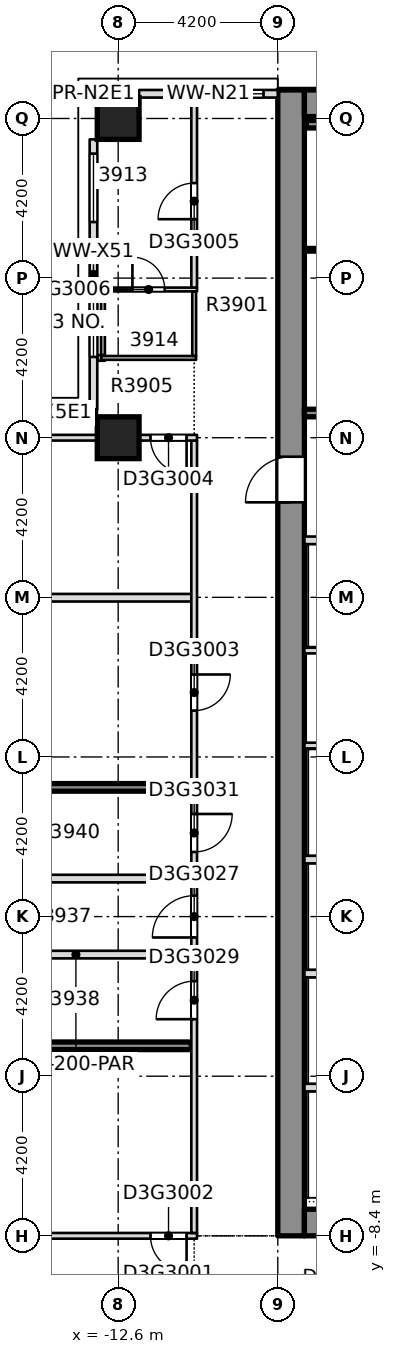
"""IFC4 building model, lengths in metres.
Left out: names, types, materials, properties, quantities, classifications, styles, units other than length and angle.
Written with IfcOpenShell. Run it as: python <this file> out.ifc"""

import sys

from ifc_helpers import new_model, si_unit, direction, frame, frame_2d, origin, origin_2d, place, context, subcontext, project, spatial, rectangle, extrude, element, fill, save


model = new_model("IFC4")
c1 = context("Model", 3, precision=1e-05, world=origin(), true_north=direction((0.0, 1.0)))
c2 = subcontext(c1, "Body", "Model", "MODEL_VIEW")
j1 = project(units=[si_unit("LENGTHUNIT", "METRE"), si_unit("PLANEANGLEUNIT", "RADIAN")], contexts=[c1])
p1 = place(None, origin())
s1 = spatial("IfcSite", under=j1, at=p1, CompositionType="ELEMENT")
p2 = place(p1, origin())
s2 = spatial("IfcBuilding", under=s1, at=p2, CompositionType="ELEMENT")
p3 = place(p2, frame((0.0, 0.0, 153.8)))
s3 = spatial("IfcBuildingStorey", under=s2, at=p3, CompositionType="ELEMENT", Elevation=153.8)
p4 = place(p3, frame((-8.05, -8.4, -0.4), z_axis=(0.0, 0.0, 1.0), x_axis=(0.0, 1.0, 0.0)))
e1 = element("IfcWall", 1, at=p4, inside=s3, PredefinedType="SOLIDWALL", context=c2, shape_type="SweptSolid", body=[
    extrude(rectangle(XDim=30.15, YDim=0.7, at=frame_2d((15.075, 0.0))), origin(), (0.0, 0.0, 1.0), 3.45),
])
p5 = place(p4, frame((19.3, 0.0, 0.4)))
e2 = element("IfcOpeningElement", 2, at=p5, cuts=e1, PredefinedType="OPENING", context=c2, shape_type="SweptSolid", body=[
    extrude(rectangle(XDim=1.2, YDim=2.1, at=frame_2d((0.6, 1.05))), frame((0.0, 0.36, 0.0), z_axis=(0.0, -1.0, 0.0), x_axis=(1.0, 0.0, 0.0)), (0.0, 0.0, 1.0), 0.72),
])
p6 = place(p3, frame((-7.7, -8.05, -0.4), z_axis=(0.0, 0.0, 1.0), x_axis=(1.0, 0.0, 0.0)))
e3 = element("IfcWall", 3, at=p6, inside=s3, PredefinedType="SHEAR", context=c2, shape_type="SweptSolid", body=[
    extrude(rectangle(XDim=15.4, YDim=0.7, at=frame_2d((7.7, 0.0))), origin(), (0.0, 0.0, 1.0), 3.45),
])
p7 = place(p6, frame((2.95, 0.0, 0.4)))
e4 = element("IfcOpeningElement", 4, at=p7, cuts=e3, PredefinedType="OPENING", context=c2, shape_type="SweptSolid", body=[
    extrude(rectangle(XDim=1.8, YDim=2.1, at=frame_2d((0.9, 1.05))), frame((0.0, 0.36, 0.0), z_axis=(0.0, -1.0, 0.0), x_axis=(1.0, 0.0, 0.0)), (0.0, 0.0, 1.0), 0.72),
])
p8 = place(p6, frame((10.65, 0.0, 0.4)))
e5 = element("IfcOpeningElement", 5, at=p8, cuts=e3, PredefinedType="OPENING", context=c2, shape_type="SweptSolid", body=[
    extrude(rectangle(XDim=1.8, YDim=2.1, at=frame_2d((0.9, 1.05))), frame((0.0, 0.36, 0.0), z_axis=(0.0, -1.0, 0.0), x_axis=(1.0, 0.0, 0.0)), (0.0, 0.0, 1.0), 0.72),
])
p9 = place(p3, frame((-7.7, 21.4, -0.4), z_axis=(0.0, 0.0, 1.0), x_axis=(1.0, 0.0, 0.0)))
e6 = element("IfcWall", 6, at=p9, inside=s3, PredefinedType="SHEAR", context=c2, shape_type="SweptSolid", body=[
    extrude(rectangle(XDim=15.4, YDim=0.7, at=frame_2d((7.7, 0.0))), origin(), (0.0, 0.0, 1.0), 3.45),
])
for number, where, z_axis, x_axis in (
    (7, (-12.6, 12.6, -0.4), (0.0, 0.0, 1.0), (1.0, 0.0, 0.0)),
    (8, (-12.6, 21.0, -0.4), (0.0, 0.0, 1.0), (1.0, 0.0, 0.0)),
):
    element("IfcColumn", number, at=place(p3, frame(where, z_axis=z_axis, x_axis=x_axis)), inside=s3, PredefinedType="COLUMN", context=c2, shape_type="SweptSolid", body=[
        extrude(rectangle(XDim=1.1, YDim=1.1, at=origin_2d()), origin(), (0.0, 0.0, 1.0), 3.45),
    ])
p10 = place(p3, frame((-21.55, -8.4, 0.0), z_axis=(0.0, 0.0, 1.0), x_axis=(1.0, 0.0, 0.0)))
e9 = element("IfcWall", 9, at=p10, inside=s3, PredefinedType="PARTITIONING", context=c2, shape_type="SweptSolid", body=[
    extrude(rectangle(XDim=11.025, YDim=0.15, at=frame_2d((5.513, 0.0))), origin(), (0.0, 0.0, 1.0), 3.05),
])
p11 = place(p10, frame((9.8, 0.0, 0.0)))
e10 = element("IfcOpeningElement", 10, at=p11, cuts=e9, PredefinedType="OPENING", context=c2, shape_type="SweptSolid", body=[
    extrude(rectangle(XDim=0.95, YDim=2.1, at=frame_2d((0.475, 1.05))), frame((0.0, 0.085, 0.0), z_axis=(0.0, -1.0, 0.0), x_axis=(1.0, 0.0, 0.0)), (0.0, 0.0, 1.0), 0.17),
])
p12 = place(p3, frame((-20.448, -3.4, 0.0), z_axis=(0.0, 0.0, 1.0), x_axis=(1.0, 0.0, 0.0)))
e11 = element("IfcWall", 11, at=p12, inside=s3, PredefinedType="SOLIDWALL", context=c2, shape_type="SweptSolid", body=[
    extrude(rectangle(XDim=9.773, YDim=0.2, at=frame_2d((4.886, 0.0))), origin(), (0.0, 0.0, 1.0), 3.05),
])
for number, where, z_axis, x_axis in (
    (12, (-16.75, -1.0, 0.0), (0.0, 0.0, 1.0), (1.0, 0.0, 0.0)),
    (13, (-16.75, 1.0, 0.0), (0.0, 0.0, 1.0), (1.0, 0.0, 0.0)),
):
    element("IfcWall", number, at=place(p3, frame(where, z_axis=z_axis, x_axis=x_axis)), inside=s3, PredefinedType="PARTITIONING", context=c2, shape_type="SweptSolid", body=[
        extrude(rectangle(XDim=6.075, YDim=0.2, at=frame_2d((3.038, 0.0))), origin(), (0.0, 0.0, 1.0), 3.05),
    ])
p13 = place(p3, frame((-21.55, 8.39, 0.0), z_axis=(0.0, 0.0, 1.0), x_axis=(1.0, 0.0, 0.0)))
e14 = element("IfcWall", 14, at=p13, inside=s3, PredefinedType="PARTITIONING", context=c2, shape_type="SweptSolid", body=[
    extrude(rectangle(XDim=10.875, YDim=0.2, at=frame_2d((5.438, 0.0))), origin(), (0.0, 0.0, 1.0), 3.05),
])
p14 = place(p3, frame((-13.15, 14.7, 0.0), z_axis=(0.0, 0.0, 1.0), x_axis=(1.0, 0.0, 0.0)))
e15 = element("IfcWall", 15, at=p14, inside=s3, PredefinedType="PARTITIONING", context=c2, shape_type="SweptSolid", body=[
    extrude(rectangle(XDim=0.2, YDim=0.15, at=frame_2d((0.1, 0.0))), origin(), (0.0, 0.0, 1.0), 3.05),
])
p15 = place(p3, frame((-13.05, 14.7, 0.0), z_axis=(0.0, 0.0, 1.0), x_axis=(1.0, 0.0, 0.0)))
e16 = element("IfcWall", 16, at=p15, inside=s3, PredefinedType="PARTITIONING", context=c2, shape_type="SweptSolid", body=[
    extrude(rectangle(XDim=2.5, YDim=0.1, at=frame_2d((1.25, 0.0))), origin(), (0.0, 0.0, 1.0), 3.05),
])
p16 = place(p3, frame((-13.05, 16.5, 0.0), z_axis=(0.0, 0.0, 1.0), x_axis=(1.0, 0.0, 0.0)))
e17 = element("IfcWall", 17, at=p16, inside=s3, PredefinedType="PARTITIONING", context=c2, shape_type="SweptSolid", body=[
    extrude(rectangle(XDim=2.525, YDim=0.1, at=frame_2d((1.263, 0.0))), origin(), (0.0, 0.0, 1.0), 3.05),
])
p17 = place(p16, frame((0.825, 0.0, 0.0)))
e18 = element("IfcOpeningElement", 18, at=p17, cuts=e17, PredefinedType="OPENING", context=c2, shape_type="SweptSolid", body=[
    extrude(rectangle(XDim=0.85, YDim=2.1, at=frame_2d((0.425, 1.05))), frame((0.0, 0.06, 0.0), z_axis=(0.0, -1.0, 0.0), x_axis=(1.0, 0.0, 0.0)), (0.0, 0.0, 1.0), 0.12),
])
p18 = place(p3, frame((-13.0, 14.775, 0.0), z_axis=(0.0, 0.0, 1.0), x_axis=(0.0, 1.0, 0.0)))
e19 = element("IfcWall", 19, at=p18, inside=s3, PredefinedType="PARTITIONING", context=c2, shape_type="SweptSolid", body=[
    extrude(rectangle(XDim=1.675, YDim=0.1, at=frame_2d((0.837, 0.0))), origin(), (0.0, 0.0, 1.0), 3.05),
])
p19 = place(p3, frame((-10.6, -8.325, 0.0), z_axis=(0.0, 0.0, 1.0), x_axis=(0.0, 1.0, 0.0)))
e20 = element("IfcWall", 20, at=p19, inside=s3, PredefinedType="PARTITIONING", context=c2, shape_type="SweptSolid", body=[
    extrude(rectangle(XDim=20.85, YDim=0.15, at=frame_2d((10.425, 0.0))), origin(), (0.0, 0.0, 1.0), 3.05),
])
p20 = place(p19, frame((13.745, 0.0, 0.0)))
e21 = element("IfcOpeningElement", 21, at=p20, cuts=e20, PredefinedType="OPENING", context=c2, shape_type="SweptSolid", body=[
    extrude(rectangle(XDim=0.95, YDim=2.1, at=frame_2d((0.475, 1.05))), frame((0.0, 0.085, 0.0), z_axis=(0.0, -1.0, 0.0), x_axis=(1.0, 0.0, 0.0)), (0.0, 0.0, 1.0), 0.17),
])
p21 = place(p19, frame((7.775, 0.0, 0.0)))
e22 = element("IfcOpeningElement", 22, at=p21, cuts=e20, PredefinedType="OPENING", context=c2, shape_type="SweptSolid", body=[
    extrude(rectangle(XDim=1.1, YDim=2.1, at=frame_2d((0.55, 1.05))), frame((0.0, 0.085, 0.0), z_axis=(0.0, -1.0, 0.0), x_axis=(1.0, 0.0, 0.0)), (0.0, 0.0, 1.0), 0.17),
])
p22 = place(p19, frame((5.625, 0.0, 0.0)))
e23 = element("IfcOpeningElement", 23, at=p22, cuts=e20, PredefinedType="OPENING", context=c2, shape_type="SweptSolid", body=[
    extrude(rectangle(XDim=1.0, YDim=2.1, at=frame_2d((0.5, 1.05))), frame((0.0, 0.085, 0.0), z_axis=(0.0, -1.0, 0.0), x_axis=(1.0, 0.0, 0.0)), (0.0, 0.0, 1.0), 0.17),
])
p23 = place(p19, frame((10.025, 0.0, 0.0)))
e24 = element("IfcOpeningElement", 24, at=p23, cuts=e20, PredefinedType="OPENING", context=c2, shape_type="SweptSolid", body=[
    extrude(rectangle(XDim=1.0, YDim=2.1, at=frame_2d((0.5, 1.05))), frame((0.0, 0.085, 0.0), z_axis=(0.0, -1.0, 0.0), x_axis=(1.0, 0.0, 0.0)), (0.0, 0.0, 1.0), 0.17),
])
p24 = place(p3, frame((-10.6, 14.75, 0.0), z_axis=(0.0, 0.0, 1.0), x_axis=(0.0, 1.0, 0.0)))
e25 = element("IfcWall", 25, at=p24, inside=s3, PredefinedType="PARTITIONING", context=c2, shape_type="SweptSolid", body=[
    extrude(rectangle(XDim=1.7, YDim=0.1, at=frame_2d((0.85, 0.0))), origin(), (0.0, 0.0, 1.0), 3.05),
])
p25 = place(p3, frame((-10.6, 16.55, 0.0), z_axis=(0.0, 0.0, 1.0), x_axis=(0.0, 1.0, 0.0)))
e26 = element("IfcWall", 26, at=p25, inside=s3, PredefinedType="PARTITIONING", context=c2, shape_type="SweptSolid", body=[
    extrude(rectangle(XDim=5.0, YDim=0.15, at=frame_2d((2.5, 0.0))), origin(), (0.0, 0.0, 1.0), 3.05),
])
p26 = place(p25, frame((1.8, 0.0, 0.0)))
e27 = element("IfcOpeningElement", 27, at=p26, cuts=e26, PredefinedType="OPENING", context=c2, shape_type="SweptSolid", body=[
    extrude(rectangle(XDim=0.95, YDim=2.1, at=frame_2d((0.475, 1.05))), frame((0.0, 0.085, 0.0), z_axis=(0.0, -1.0, 0.0), x_axis=(1.0, 0.0, 0.0)), (0.0, 0.0, 1.0), 0.17),
])
p27 = place(p3, frame((-8.4, 21.65, 0.0), z_axis=(0.0, 0.0, 1.0), x_axis=(-1.0, 0.0, 0.0)))
e28 = element("IfcWall", 28, at=p27, inside=s3, PredefinedType="STANDARD", context=c2, shape_type="SweptSolid", body=[
    extrude(rectangle(XDim=3.65, YDim=0.2, at=frame_2d((1.825, 0.0))), origin(), (0.0, 0.0, 1.0), 3.05),
])
p28 = place(p27, frame((0.375, 0.0, 0.2)))
e29 = element("IfcOpeningElement", 29, at=p28, cuts=e28, PredefinedType="OPENING", context=c2, shape_type="SweptSolid", body=[
    extrude(rectangle(XDim=1.8, YDim=2.65, at=frame_2d((0.9, 1.325))), frame((0.0, 0.11, 0.0), z_axis=(0.0, -1.0, 0.0), x_axis=(1.0, 0.0, 0.0)), (0.0, 0.0, 1.0), 0.22),
])
p29 = place(p3, frame((-13.25, 20.45, 0.0), z_axis=(0.0, 0.0, 1.0), x_axis=(0.0, -1.0, 0.0)))
e30 = element("IfcWall", 30, at=p29, inside=s3, PredefinedType="STANDARD", context=c2, shape_type="SweptSolid", body=[
    extrude(rectangle(XDim=7.1, YDim=0.2, at=frame_2d((3.55, 0.0))), origin(), (0.0, 0.0, 1.0), 3.05),
])
p30 = place(p29, frame((3.925, 0.0, 0.2)))
e31 = element("IfcOpeningElement", 31, at=p30, cuts=e30, PredefinedType="OPENING", context=c2, shape_type="SweptSolid", body=[
    extrude(rectangle(XDim=1.8, YDim=2.65, at=frame_2d((0.9, 1.325))), frame((0.0, 0.11, 0.0), z_axis=(0.0, -1.0, 0.0), x_axis=(1.0, 0.0, 0.0)), (0.0, 0.0, 1.0), 0.22),
])
p31 = place(p29, frame((0.375, 0.0, 0.2)))
e32 = element("IfcOpeningElement", 32, at=p31, cuts=e30, PredefinedType="OPENING", context=c2, shape_type="SweptSolid", body=[
    extrude(rectangle(XDim=1.8, YDim=2.65, at=frame_2d((0.9, 1.325))), frame((0.0, 0.11, 0.0), z_axis=(0.0, -1.0, 0.0), x_axis=(1.0, 0.0, 0.0)), (0.0, 0.0, 1.0), 0.22),
])
p32 = place(p3, frame((-13.35, 13.25, 0.0), z_axis=(0.0, 0.0, 1.0), x_axis=(-1.0, 0.0, 0.0)))
e33 = element("IfcWall", 33, at=p32, inside=s3, PredefinedType="STANDARD", context=c2, shape_type="SweptSolid", body=[
    extrude(rectangle(XDim=7.1, YDim=0.2, at=frame_2d((3.55, 0.0))), origin(), (0.0, 0.0, 1.0), 3.05),
])
for number, where, z_axis, x_axis in (
    (34, (-7.699, -4.5, 0.0), (0.0, 0.0, 1.0), (1.0, 0.0, 0.0)),
    (35, (-7.699, -1.5, 0.0), (0.0, 0.0, 1.0), (1.0, 0.0, 0.0)),
    (36, (-7.699, 1.5, 0.0), (0.0, 0.0, 1.0), (1.0, 0.0, 0.0)),
):
    element("IfcWall", number, at=place(p3, frame(where, z_axis=z_axis, x_axis=x_axis)), inside=s3, PredefinedType="PARTITIONING", context=c2, shape_type="SweptSolid", body=[
        extrude(rectangle(XDim=2.124, YDim=0.2, at=frame_2d((1.062, 0.0))), origin(), (0.0, 0.0, 1.0), 3.05),
    ])
p33 = place(p3, frame((-7.699, 4.5, 0.0), z_axis=(0.0, 0.0, 1.0), x_axis=(1.0, 0.0, 0.0)))
e37 = element("IfcWall", 37, at=p33, inside=s3, PredefinedType="PARTITIONING", context=c2, shape_type="SweptSolid", body=[
    extrude(rectangle(XDim=2.274, YDim=0.15, at=frame_2d((1.137, 0.0))), origin(), (0.0, 0.0, 1.0), 3.05),
])
p34 = place(p3, frame((-7.699, 7.0, 0.0), z_axis=(0.0, 0.0, 1.0), x_axis=(1.0, 0.0, 0.0)))
e38 = element("IfcWall", 38, at=p34, inside=s3, PredefinedType="PARTITIONING", context=c2, shape_type="SweptSolid", body=[
    extrude(rectangle(XDim=15.398, YDim=0.15, at=frame_2d((7.699, 0.0))), origin(), (0.0, 0.0, 1.0), 3.05),
])
p35 = place(p34, frame((6.999, 0.0, 0.0)))
e39 = element("IfcOpeningElement", 39, at=p35, cuts=e38, PredefinedType="OPENING", context=c2, shape_type="SweptSolid", body=[
    extrude(rectangle(XDim=1.4, YDim=2.1, at=frame_2d((0.7, 1.05))), frame((0.0, 0.085, 0.0), z_axis=(0.0, -1.0, 0.0), x_axis=(1.0, 0.0, 0.0)), (0.0, 0.0, 1.0), 0.17),
])
p36 = place(p3, frame((-7.699, 9.9, 0.0), z_axis=(0.0, 0.0, 1.0), x_axis=(1.0, 0.0, 0.0)))
e40 = element("IfcWall", 40, at=p36, inside=s3, PredefinedType="PARTITIONING", context=c2, shape_type="SweptSolid", body=[
    extrude(rectangle(XDim=4.099, YDim=0.2, at=frame_2d((2.049, 0.0))), origin(), (0.0, 0.0, 1.0), 3.05),
])
p37 = place(p36, frame((0.749, 0.0, 0.0)))
e41 = element("IfcOpeningElement", 41, at=p37, cuts=e40, PredefinedType="OPENING", context=c2, shape_type="SweptSolid", body=[
    extrude(rectangle(XDim=1.1, YDim=2.1, at=frame_2d((0.55, 1.05))), frame((0.0, 0.11, 0.0), z_axis=(0.0, -1.0, 0.0), x_axis=(1.0, 0.0, 0.0)), (0.0, 0.0, 1.0), 0.22),
])
p38 = place(p3, frame((-7.699, 13.25, 0.0), z_axis=(0.0, 0.0, 1.0), x_axis=(1.0, 0.0, 0.0)))
e42 = element("IfcWall", 42, at=p38, inside=s3, PredefinedType="SOLIDWALL", context=c2, shape_type="SweptSolid", body=[
    extrude(rectangle(XDim=4.274, YDim=0.2, at=frame_2d((2.137, 0.0))), origin(), (0.0, 0.0, 1.0), 3.05),
])
p39 = place(p38, frame((1.249, 0.0, 0.0)))
e43 = element("IfcOpeningElement", 43, at=p39, cuts=e42, PredefinedType="OPENING", context=c2, shape_type="SweptSolid", body=[
    extrude(rectangle(XDim=1.2, YDim=2.1, at=frame_2d((0.6, 1.05))), frame((0.0, 0.11, 0.0), z_axis=(0.0, -1.0, 0.0), x_axis=(1.0, 0.0, 0.0)), (0.0, 0.0, 1.0), 0.22),
])
p40 = place(p3, frame((-7.65, 20.85, 0.0), z_axis=(0.0, 0.0, 1.0), x_axis=(1.0, 0.0, 0.0)))
e44 = element("IfcWall", 44, at=p40, inside=s3, PredefinedType="SOLIDWALL", context=c2, shape_type="SweptSolid", body=[
    extrude(rectangle(XDim=3.5, YDim=0.2, at=frame_2d((1.75, 0.0))), origin(), (0.0, 0.0, 1.0), 3.05),
])
p41 = place(p3, frame((-21.55, 3.4, 0.0), z_axis=(0.0, 0.0, 1.0), x_axis=(1.0, 0.0, 0.0)))
e45 = element("IfcWall", 45, at=p41, inside=s3, PredefinedType="SOLIDWALL", context=c2, shape_type="SweptSolid", body=[
    extrude(rectangle(XDim=10.875, YDim=0.2, at=frame_2d((5.438, 0.0))), origin(), (0.0, 0.0, 1.0), 3.05),
])
p42 = place(p3, frame((-20.45, 12.6, 0.0), z_axis=(0.0, 0.0, 1.0), x_axis=(1.0, 0.0, 0.0)))
e46 = element("IfcWall", 46, at=p42, inside=s3, PredefinedType="PARTITIONING", context=c2, shape_type="SweptSolid", body=[
    extrude(rectangle(XDim=7.3, YDim=0.15, at=frame_2d((3.65, 0.0))), origin(), (0.0, 0.0, 1.0), 2.5),
])
p43 = place(p3, frame((-13.15, 12.6, 0.0), z_axis=(0.0, 0.0, 1.0), x_axis=(1.0, 0.0, 0.0)))
e47 = element("IfcWall", 47, at=p43, inside=s3, PredefinedType="PARTITIONING", context=c2, shape_type="SweptSolid", body=[
    extrude(rectangle(XDim=2.625, YDim=0.15, at=frame_2d((1.312, 0.0))), origin(), (0.0, 0.0, 1.0), 3.05),
])
p44 = place(p43, frame((1.4, 0.0, 0.0)))
e48 = element("IfcOpeningElement", 48, at=p44, cuts=e47, PredefinedType="OPENING", context=c2, shape_type="SweptSolid", body=[
    extrude(rectangle(XDim=0.95, YDim=2.1, at=frame_2d((0.475, 1.05))), frame((0.0, 0.085, 0.0), z_axis=(0.0, -1.0, 0.0), x_axis=(1.0, 0.0, 0.0)), (0.0, 0.0, 1.0), 0.17),
])
p45 = place(p11, origin())
e49 = element("IfcDoor", 49, at=p45, inside=s3, OperationType="SINGLE_SWING_LEFT", PredefinedType="DOOR", context=c2, shape_type="SweptSolid", body=[
    extrude(rectangle(XDim=0.95, YDim=2.1, at=frame_2d((0.475, 1.05))), frame((0.0, 0.025, 0.0), z_axis=(0.0, -1.0, 0.0), x_axis=(1.0, 0.0, 0.0)), (0.0, 0.0, 1.0), 0.05),
])
fill(e10, e49)
p46 = place(p20, origin())
e50 = element("IfcDoor", 50, at=p46, inside=s3, OperationType="SINGLE_SWING_LEFT", PredefinedType="DOOR", context=c2, shape_type="SweptSolid", body=[
    extrude(rectangle(XDim=0.95, YDim=2.1, at=frame_2d((0.475, 1.05))), frame((0.0, 0.025, 0.0), z_axis=(0.0, -1.0, 0.0), x_axis=(1.0, 0.0, 0.0)), (0.0, 0.0, 1.0), 0.05),
])
fill(e21, e50)
p47 = place(p44, origin())
e51 = element("IfcDoor", 51, at=p47, inside=s3, OperationType="SINGLE_SWING_RIGHT", PredefinedType="DOOR", context=c2, shape_type="SweptSolid", body=[
    extrude(rectangle(XDim=0.95, YDim=2.1, at=frame_2d((0.475, 1.05))), frame((0.0, 0.025, 0.0), z_axis=(0.0, -1.0, 0.0), x_axis=(1.0, 0.0, 0.0)), (0.0, 0.0, 1.0), 0.05),
])
fill(e48, e51)
p48 = place(p26, origin())
e52 = element("IfcDoor", 52, at=p48, inside=s3, OperationType="SINGLE_SWING_RIGHT", PredefinedType="DOOR", context=c2, shape_type="SweptSolid", body=[
    extrude(rectangle(XDim=0.95, YDim=2.1, at=frame_2d((0.475, 1.05))), frame((0.0, 0.025, 0.0), z_axis=(0.0, -1.0, 0.0), x_axis=(1.0, 0.0, 0.0)), (0.0, 0.0, 1.0), 0.05),
])
fill(e27, e52)
p49 = place(p17, origin())
e53 = element("IfcDoor", 53, at=p49, inside=s3, OperationType="SINGLE_SWING_RIGHT", PredefinedType="DOOR", context=c2, shape_type="SweptSolid", body=[
    extrude(rectangle(XDim=0.85, YDim=2.1, at=frame_2d((0.425, 1.05))), frame((0.0, 0.025, 0.0), z_axis=(0.0, -1.0, 0.0), x_axis=(1.0, 0.0, 0.0)), (0.0, 0.0, 1.0), 0.05),
])
fill(e18, e53)
p50 = place(p21, origin())
e54 = element("IfcDoor", 54, at=p50, inside=s3, OperationType="SINGLE_SWING_LEFT", PredefinedType="DOOR", context=c2, shape_type="SweptSolid", body=[
    extrude(rectangle(XDim=1.1, YDim=2.1, at=frame_2d((0.55, 1.05))), frame((0.0, 0.025, 0.0), z_axis=(0.0, -1.0, 0.0), x_axis=(1.0, 0.0, 0.0)), (0.0, 0.0, 1.0), 0.05),
])
fill(e22, e54)
p51 = place(p22, origin())
e55 = element("IfcDoor", 55, at=p51, inside=s3, OperationType="SINGLE_SWING_RIGHT", PredefinedType="DOOR", context=c2, shape_type="SweptSolid", body=[
    extrude(rectangle(XDim=1.0, YDim=2.1, at=frame_2d((0.5, 1.05))), frame((0.0, 0.025, 0.0), z_axis=(0.0, -1.0, 0.0), x_axis=(1.0, 0.0, 0.0)), (0.0, 0.0, 1.0), 0.05),
])
fill(e23, e55)
p52 = place(p23, origin())
e56 = element("IfcDoor", 56, at=p52, inside=s3, OperationType="SINGLE_SWING_LEFT", PredefinedType="DOOR", context=c2, shape_type="SweptSolid", body=[
    extrude(rectangle(XDim=1.0, YDim=2.1, at=frame_2d((0.5, 1.05))), frame((0.0, 0.025, 0.0), z_axis=(0.0, -1.0, 0.0), x_axis=(1.0, 0.0, 0.0)), (0.0, 0.0, 1.0), 0.05),
])
fill(e24, e56)
p53 = place(p28, origin())
e57 = element("IfcWindow", 57, at=p53, inside=s3, PartitioningType="SINGLE_PANEL", PredefinedType="WINDOW", context=c2, shape_type="SweptSolid", body=[
    extrude(rectangle(XDim=1.8, YDim=2.65, at=frame_2d((0.9, 1.325))), frame((0.0, 0.03, 0.0), z_axis=(0.0, -1.0, 0.0), x_axis=(1.0, 0.0, 0.0)), (0.0, 0.0, 1.0), 0.06),
])
fill(e29, e57)
p54 = place(p30, origin())
e58 = element("IfcWindow", 58, at=p54, inside=s3, PartitioningType="SINGLE_PANEL", PredefinedType="WINDOW", context=c2, shape_type="SweptSolid", body=[
    extrude(rectangle(XDim=1.8, YDim=2.65, at=frame_2d((0.9, 1.325))), frame((0.0, 0.03, 0.0), z_axis=(0.0, -1.0, 0.0), x_axis=(1.0, 0.0, 0.0)), (0.0, 0.0, 1.0), 0.06),
])
fill(e31, e58)
p55 = place(p31, origin())
e59 = element("IfcWindow", 59, at=p55, inside=s3, PartitioningType="SINGLE_PANEL", PredefinedType="WINDOW", context=c2, shape_type="SweptSolid", body=[
    extrude(rectangle(XDim=1.8, YDim=2.65, at=frame_2d((0.9, 1.325))), frame((0.0, 0.03, 0.0), z_axis=(0.0, -1.0, 0.0), x_axis=(1.0, 0.0, 0.0)), (0.0, 0.0, 1.0), 0.06),
])
fill(e32, e59)
p56 = place(p5, origin())
e60 = element("IfcDoor", 60, at=p56, inside=s3, OperationType="SINGLE_SWING_LEFT", PredefinedType="DOOR", context=c2, shape_type="SweptSolid", body=[
    extrude(rectangle(XDim=1.2, YDim=2.1, at=frame_2d((0.6, 1.05))), frame((0.0, 0.025, 0.0), z_axis=(0.0, -1.0, 0.0), x_axis=(1.0, 0.0, 0.0)), (0.0, 0.0, 1.0), 0.05),
])
fill(e2, e60)
save(model, sys.argv[1])
